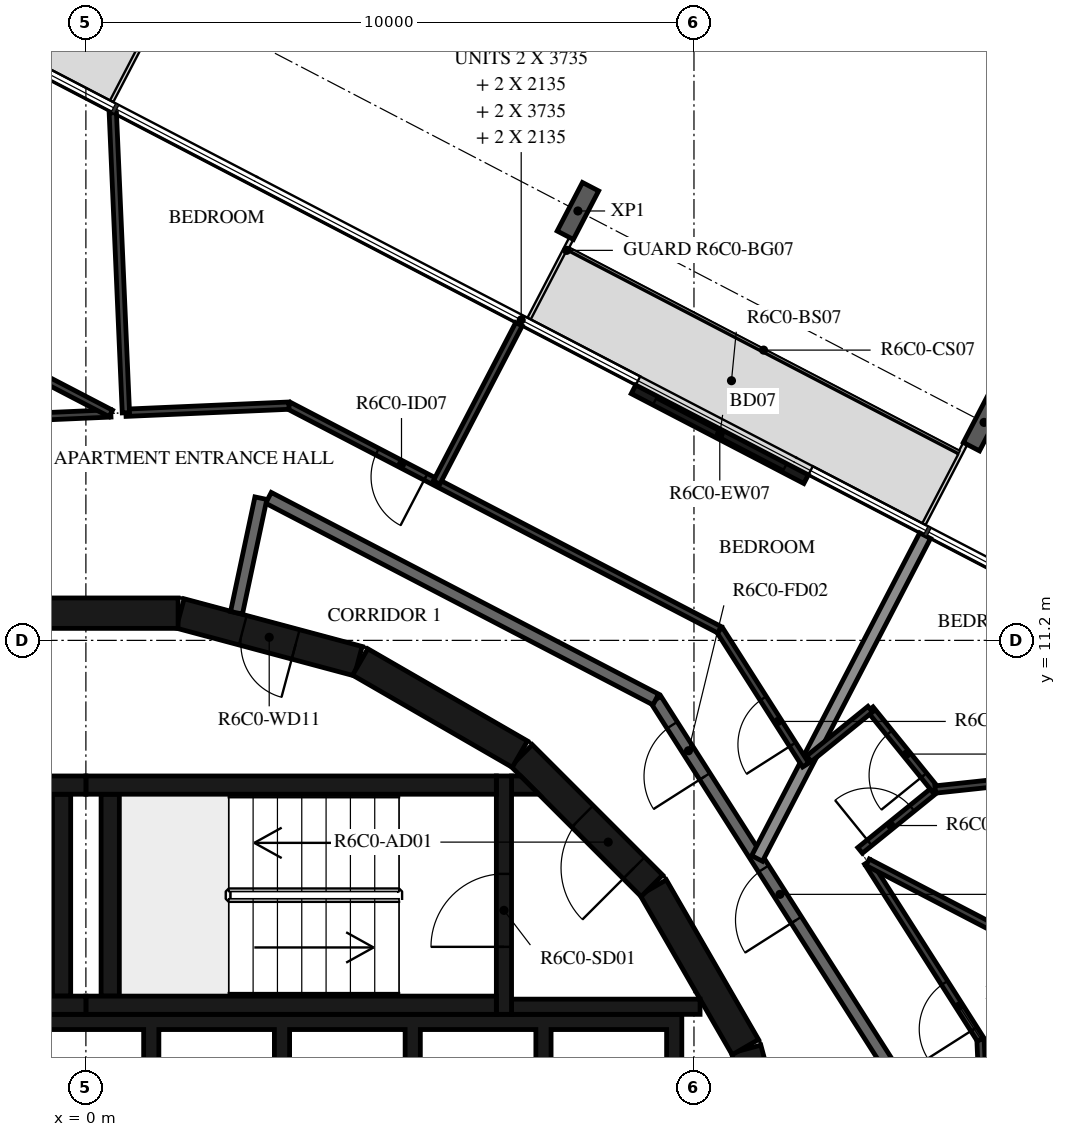
"""IFC4 building model, lengths in metres.
Left out: names, types, materials, properties, quantities, classifications, styles, units other than length and angle.
Written with IfcOpenShell. Run it as: python <this file> out.ifc"""

import sys

from ifc_helpers import new_model, si_unit, direction, frame, frame_2d, origin, origin_2d, place, context, subcontext, project, spatial, polyline, rectangle, i_section, outline, extrude, element, fill, save


model = new_model("IFC4")
c1 = context("Model", 3, precision=1e-05, world=origin(), true_north=direction((0.0, 1.0)))
c2 = subcontext(c1, "Body", "Model", "MODEL_VIEW")
j1 = project(units=[si_unit("LENGTHUNIT", "METRE"), si_unit("PLANEANGLEUNIT", "RADIAN")], contexts=[c1])
p1 = place(None, origin())
s1 = spatial("IfcSite", under=j1, at=p1, CompositionType="ELEMENT")
p2 = place(p1, origin())
s2 = spatial("IfcBuilding", under=s1, at=p2, CompositionType="ELEMENT")
p3 = place(p2, frame((0.0, 0.0, 247.7)))
s3 = spatial("IfcBuildingStorey", under=s2, at=p3, CompositionType="ELEMENT", Elevation=247.7)
for number, where, z_axis, x_axis in (
    (1, (14.771, 14.784, -0.38), (0.0, 0.0, 1.0), (0.887, -0.462, 0.0)),
    (2, (8.091, 18.261, -0.38), (0.0, 0.0, 1.0), (0.887, -0.462, 0.0)),
):
    element("IfcColumn", number, at=place(p3, frame(where, z_axis=z_axis, x_axis=x_axis)), inside=s3, PredefinedType="COLUMN", context=c2, shape_type="SweptSolid", body=[
        extrude(i_section(OverallWidth=0.3, OverallDepth=0.9, WebThickness=0.019, FlangeThickness=0.035, FilletRadius=0.03, at=origin_2d()), origin(), (0.0, 0.0, 1.0), 3.5),
    ])
p4 = place(p3, frame((11.844, 13.851, 0.0), z_axis=(0.0, 0.0, 1.0), x_axis=(-0.887014349583, 0.461741858221, 0.0)))
e3 = element("IfcWall", 3, at=p4, inside=s3, PredefinedType="STANDARD", context=c2, shape_type="SweptSolid", body=[
    extrude(rectangle(XDim=3.2, YDim=0.16, at=frame_2d((1.6, 0.0))), origin(), (0.0, 0.0, 1.0), 3.12),
])
p5 = place(p4, frame((0.4, 0.0, 0.0)))
e4 = element("IfcOpeningElement", 4, at=p5, cuts=e3, PredefinedType="OPENING", context=c2, shape_type="SweptSolid", body=[
    extrude(rectangle(XDim=2.4, YDim=2.4, at=frame_2d((1.2, 1.2))), frame((0.0, 0.09, 0.0), z_axis=(0.0, -1.0, 0.0), x_axis=(1.0, 0.0, 0.0)), (0.0, 0.0, 1.0), 0.18),
])
for number, where, z_axis, x_axis in (
    (5, (11.643, 1.55, 0.0), (0.0, 0.0, 1.0), (-0.259, 0.966, 0.0)),
    (6, (10.845, 4.51, 0.0), (0.0, 0.0, 1.0), (-0.5, 0.866, 0.0)),
):
    element("IfcWall", number, at=place(p3, frame(where, z_axis=z_axis, x_axis=x_axis)), inside=s3, PredefinedType="SHEAR", context=c2, shape_type="SweptSolid", body=[
        extrude(rectangle(XDim=3.033, YDim=0.5, at=frame_2d((1.516, 0.0))), origin(), (0.0, 0.0, 1.0), 3.12),
    ])
p6 = place(p3, frame((9.308, 7.164, 0.0), z_axis=(0.0, 0.0, 1.0), x_axis=(-0.707106781187, 0.707106781187, 0.0)))
e7 = element("IfcWall", 7, at=p6, inside=s3, PredefinedType="SHEAR", context=c2, shape_type="SweptSolid", body=[
    extrude(rectangle(XDim=3.032, YDim=0.5, at=frame_2d((1.516, 0.0))), origin(), (0.0, 0.0, 1.0), 3.12),
])
p7 = place(p6, frame((0.416, 0.0, 0.0)))
e8 = element("IfcOpeningElement", 8, at=p7, cuts=e7, PredefinedType="OPENING", context=c2, shape_type="SweptSolid", body=[
    extrude(rectangle(XDim=1.2, YDim=2.1, at=frame_2d((0.6, 1.05))), frame((0.0, 0.26, 0.0), z_axis=(0.0, -1.0, 0.0), x_axis=(1.0, 0.0, 0.0)), (0.0, 0.0, 1.0), 0.52),
])
p8 = place(p3, frame((7.137, 9.329, 0.0), z_axis=(0.0, 0.0, 1.0), x_axis=(-0.865975092491, 0.500087131594, 0.0)))
e9 = element("IfcWall", 9, at=p8, inside=s3, PredefinedType="SHEAR", context=c2, shape_type="SweptSolid", body=[
    extrude(rectangle(XDim=3.033, YDim=0.5, at=frame_2d((1.516, 0.0))), origin(), (0.0, 0.0, 1.0), 3.12),
])
p9 = place(p3, frame((4.479, 10.858, 0.0), z_axis=(0.0, 0.0, 1.0), x_axis=(-0.965948410781, 0.258734743916, 0.0)))
e10 = element("IfcWall", 10, at=p9, inside=s3, PredefinedType="SHEAR", context=c2, shape_type="SweptSolid", body=[
    extrude(rectangle(XDim=3.033, YDim=0.5, at=frame_2d((1.516, 0.0))), origin(), (0.0, 0.0, 1.0), 3.12),
])
p10 = place(p9, frame((1.066, 0.0, 0.0)))
e11 = element("IfcOpeningElement", 11, at=p10, cuts=e10, PredefinedType="OPENING", context=c2, shape_type="SweptSolid", body=[
    extrude(rectangle(XDim=0.9, YDim=2.1, at=frame_2d((0.45, 1.05))), frame((0.0, 0.26, 0.0), z_axis=(0.0, -1.0, 0.0), x_axis=(1.0, 0.0, 0.0)), (0.0, 0.0, 1.0), 0.52),
])
p11 = place(p3, frame((1.516, 11.647, 0.0), z_axis=(0.0, 0.0, 1.0), x_axis=(-1.0, 0.0, 0.0)))
e12 = element("IfcWall", 12, at=p11, inside=s3, PredefinedType="SHEAR", context=c2, shape_type="SweptSolid", body=[
    extrude(rectangle(XDim=3.033, YDim=0.5, at=frame_2d((1.516, 0.0))), origin(), (0.0, 0.0, 1.0), 3.12),
])
for number, where, z_axis, x_axis in (
    (13, (0.0, 5.2, 0.0), (0.0, 0.0, 1.0), (1.0, 0.0, 0.0)),
    (14, (0.0, 8.82, 0.0), (0.0, 0.0, 1.0), (1.0, 0.0, 0.0)),
):
    element("IfcWall", number, at=place(p3, frame(where, z_axis=z_axis, x_axis=x_axis)), inside=s3, PredefinedType="SHEAR", context=c2, shape_type="SweptSolid", body=[
        extrude(rectangle(XDim=6.75, YDim=0.3, at=frame_2d((3.375, 0.0))), origin(), (0.0, 0.0, 1.0), 3.12),
    ])
p12 = place(p3, frame((0.4, 5.35, 0.0), z_axis=(0.0, 0.0, 1.0), x_axis=(0.0, 1.0, 0.0)))
e15 = element("IfcWall", 15, at=p12, inside=s3, PredefinedType="SHEAR", context=c2, shape_type="SweptSolid", body=[
    extrude(rectangle(XDim=3.32, YDim=0.3, at=frame_2d((1.66, 0.0))), origin(), (0.0, 0.0, 1.0), 3.12),
])
p13 = place(p3, frame((6.875, 5.05, 0.0), z_axis=(0.0, 0.0, 1.0), x_axis=(0.0, 1.0, 0.0)))
e16 = element("IfcWall", 16, at=p13, inside=s3, PredefinedType="SHEAR", context=c2, shape_type="SweptSolid", body=[
    extrude(rectangle(XDim=3.92, YDim=0.25, at=frame_2d((1.96, 0.0))), origin(), (0.0, 0.0, 1.0), 3.12),
])
p14 = place(p13, frame((1.11, 0.0, 0.0)))
e17 = element("IfcOpeningElement", 17, at=p14, cuts=e16, PredefinedType="OPENING", context=c2, shape_type="SweptSolid", body=[
    extrude(rectangle(XDim=1.2, YDim=2.1, at=frame_2d((0.6, 1.05))), frame((0.0, 0.135, 0.0), z_axis=(0.0, -1.0, 0.0), x_axis=(1.0, 0.0, 0.0)), (0.0, 0.0, 1.0), 0.27),
])
p15 = place(p3, frame((7.0, 5.175, 0.0), z_axis=(0.0, 0.0, 1.0), x_axis=(1.0, 0.0, 0.0)))
e18 = element("IfcWall", 18, at=p15, inside=s3, PredefinedType="SHEAR", context=c2, shape_type="SweptSolid", body=[
    extrude(rectangle(XDim=3.1, YDim=0.25, at=frame_2d((1.55, 0.0))), origin(), (0.0, 0.0, 1.0), 3.12),
])
p16 = place(p3, origin())
e19 = element("IfcWall", 19, at=p16, inside=s3, PredefinedType="SHEAR", context=c2, shape_type="SweptSolid", body=[
    extrude(outline(polyline([(7.448, 8.67), (7.0, 8.67), (7.0, 8.97), (7.148, 8.97), (7.448, 8.67)])), origin(), (0.0, 0.0, 1.0), 3.12),
])
for number, where, z_axis, x_axis in (
    (20, (-6.75, 5.2, 0.0), (0.0, 0.0, 1.0), (1.0, 0.0, 0.0)),
    (21, (-6.75, 8.82, 0.0), (0.0, 0.0, 1.0), (1.0, 0.0, 0.0)),
):
    element("IfcWall", number, at=place(p3, frame(where, z_axis=z_axis, x_axis=x_axis)), inside=s3, PredefinedType="SHEAR", context=c2, shape_type="SweptSolid", body=[
        extrude(rectangle(XDim=6.75, YDim=0.3, at=frame_2d((3.375, 0.0))), origin(), (0.0, 0.0, 1.0), 3.12),
    ])
p17 = place(p3, frame((-0.4, 5.35, 0.0), z_axis=(0.0, 0.0, 1.0), x_axis=(0.0, 1.0, 0.0)))
e22 = element("IfcWall", 22, at=p17, inside=s3, PredefinedType="SHEAR", context=c2, shape_type="SweptSolid", body=[
    extrude(rectangle(XDim=3.32, YDim=0.3, at=frame_2d((1.66, 0.0))), origin(), (0.0, 0.0, 1.0), 3.12),
])
p18 = place(p3, origin())
e23 = element("IfcWall", 23, at=p18, inside=s3, PredefinedType="SHEAR", context=c2, shape_type="SweptSolid", body=[
    extrude(outline(polyline([(-9.55, 4.8), (-1.2, 4.8), (-1.2, 1.9), (-0.95, 1.9), (-0.95, 4.8), (0.95, 4.8), (0.95, 1.9), (1.2, 1.9), (1.2, 4.8), (3.1, 4.8), (3.1, 1.9), (3.35, 1.9), (3.35, 4.8), (5.25, 4.8), (5.25, 1.9), (5.5, 1.9), (5.5, 4.8), (7.4, 4.8), (7.4, 1.9), (7.65, 1.9), (7.65, 4.8), (9.55, 4.8), (9.55, 1.9), (9.8, 1.9), (9.8, 4.8), (9.8, 5.05), (-9.8, 5.05), (-9.8, 4.8), (-9.8, 1.9), (-9.55, 1.9), (-9.55, 4.8)])), origin(), (0.0, 0.0, 1.0), 3.12),
])
p19 = place(p3, frame((13.231, 4.172, 0.0), z_axis=(0.0, 0.0, 1.0), x_axis=(-0.537304397561, 0.843388394728, 0.0)))
e24 = element("IfcWall", 24, at=p19, inside=s3, PredefinedType="STANDARD", context=c2, shape_type="SweptSolid", body=[
    extrude(rectangle(XDim=7.181, YDim=0.2, at=frame_2d((3.59, 0.0))), origin(), (0.0, 0.0, 1.0), 3.12),
])
p20 = place(p19, frame((2.881, 0.0, 0.0)))
e25 = element("IfcOpeningElement", 25, at=p20, cuts=e24, PredefinedType="OPENING", context=c2, shape_type="SweptSolid", body=[
    extrude(rectangle(XDim=1.0, YDim=2.1, at=frame_2d((0.5, 1.05))), frame((0.0, 0.11, 0.0), z_axis=(0.0, -1.0, 0.0), x_axis=(1.0, 0.0, 0.0)), (0.0, 0.0, 1.0), 0.22),
])
p21 = place(p19, frame((5.681, 0.0, 0.0)))
e26 = element("IfcOpeningElement", 26, at=p21, cuts=e24, PredefinedType="OPENING", context=c2, shape_type="SweptSolid", body=[
    extrude(rectangle(XDim=1.0, YDim=2.1, at=frame_2d((0.5, 1.05))), frame((0.0, 0.11, 0.0), z_axis=(0.0, -1.0, 0.0), x_axis=(1.0, 0.0, 0.0)), (0.0, 0.0, 1.0), 0.22),
])
p22 = place(p3, frame((9.372, 10.228, 0.0), z_axis=(0.0, 0.0, 1.0), x_axis=(-0.887005184532, 0.461759464021, 0.0)))
e27 = element("IfcWall", 27, at=p22, inside=s3, PredefinedType="STANDARD", context=c2, shape_type="SweptSolid", body=[
    extrude(rectangle(XDim=7.181, YDim=0.2, at=frame_2d((3.591, 0.0))), origin(), (0.0, 0.0, 1.0), 3.12),
])
p23 = place(p3, frame((2.878, 13.538, 0.0), z_axis=(0.0, 0.0, 1.0), x_axis=(-0.207893604596, -0.978151444904, 0.0)))
e28 = element("IfcWall", 28, at=p23, inside=s3, PredefinedType="STANDARD", context=c2, shape_type="SweptSolid", body=[
    extrude(rectangle(XDim=1.927, YDim=0.2, at=frame_2d((0.963, 0.0))), origin(), (0.0, 0.0, 1.0), 3.12),
])
p24 = place(p3, frame((13.801, 12.922, 0.0), z_axis=(0.0, 0.0, 1.0), x_axis=(-0.461726485624, -0.887022351733, 0.0)))
e29 = element("IfcWall", 29, at=p24, inside=s3, PredefinedType="STANDARD", context=c2, shape_type="SweptSolid", body=[
    extrude(rectangle(XDim=5.984, YDim=0.2, at=frame_2d((2.992, 0.0))), origin(), (0.0, 0.0, 1.0), 2.73),
])
p25 = place(p3, frame((14.761, 3.5, 0.0), z_axis=(0.0, 0.0, 1.0), x_axis=(-0.04369750018, 0.999044808043, 0.0)))
e30 = element("IfcWall", 30, at=p25, inside=s3, PredefinedType="PARTITIONING", context=c2, shape_type="SweptSolid", body=[
    extrude(rectangle(XDim=1.14, YDim=0.12, at=frame_2d((0.57, 0.0))), origin(), (0.0, 0.0, 1.0), 3.12),
])
p26 = place(p3, frame((14.712, 4.639, 0.0), z_axis=(0.0, 0.0, 1.0), x_axis=(-0.537287126609, 0.843399397427, 0.0)))
e31 = element("IfcWall", 31, at=p26, inside=s3, PredefinedType="PARTITIONING", context=c2, shape_type="SweptSolid", body=[
    extrude(rectangle(XDim=3.453, YDim=0.12, at=frame_2d((1.727, 0.0))), origin(), (0.0, 0.0, 1.0), 3.12),
])
p27 = place(p26, frame((0.2, 0.0, 0.0)))
e32 = element("IfcOpeningElement", 32, at=p27, cuts=e31, PredefinedType="OPENING", context=c2, shape_type="SweptSolid", body=[
    extrude(rectangle(XDim=0.9, YDim=2.1, at=frame_2d((0.45, 1.05))), frame((0.0, 0.07, 0.0), z_axis=(0.0, -1.0, 0.0), x_axis=(1.0, 0.0, 0.0)), (0.0, 0.0, 1.0), 0.14),
])
p28 = place(p3, frame((12.732, 7.746, 0.0), z_axis=(0.0, 0.0, 1.0), x_axis=(0.777187694298, 0.62926885179, 0.0)))
e33 = element("IfcWall", 33, at=p28, inside=s3, PredefinedType="PARTITIONING", context=c2, shape_type="SweptSolid", body=[
    extrude(rectangle(XDim=1.591, YDim=0.12, at=frame_2d((0.795, 0.0))), origin(), (0.0, 0.0, 1.0), 3.12),
])
p29 = place(p28, frame((0.2, 0.0, 0.0)))
e34 = element("IfcOpeningElement", 34, at=p29, cuts=e33, PredefinedType="OPENING", context=c2, shape_type="SweptSolid", body=[
    extrude(rectangle(XDim=0.9, YDim=2.1, at=frame_2d((0.45, 1.05))), frame((0.0, 0.07, 0.0), z_axis=(0.0, -1.0, 0.0), x_axis=(1.0, 0.0, 0.0)), (0.0, 0.0, 1.0), 0.14),
])
p30 = place(p3, frame((13.969, 8.747, 0.0), z_axis=(0.0, 0.0, 1.0), x_axis=(-0.629359312443, 0.777114441921, 0.0)))
e35 = element("IfcWall", 35, at=p30, inside=s3, PredefinedType="PARTITIONING", context=c2, shape_type="SweptSolid", body=[
    extrude(rectangle(XDim=1.7, YDim=0.12, at=frame_2d((0.85, 0.0))), origin(), (0.0, 0.0, 1.0), 3.12),
])
p31 = place(p30, frame((0.3, 0.0, 0.0)))
e36 = element("IfcOpeningElement", 36, at=p31, cuts=e35, PredefinedType="OPENING", context=c2, shape_type="SweptSolid", body=[
    extrude(rectangle(XDim=0.9, YDim=2.1, at=frame_2d((0.45, 1.05))), frame((0.0, 0.07, 0.0), z_axis=(0.0, -1.0, 0.0), x_axis=(1.0, 0.0, 0.0)), (0.0, 0.0, 1.0), 0.14),
])
p32 = place(p3, frame((12.898, 10.069, 0.0), z_axis=(0.0, 0.0, 1.0), x_axis=(-0.777069405334, -0.629414918232, 0.0)))
e37 = element("IfcWall", 37, at=p32, inside=s3, PredefinedType="PARTITIONING", context=c2, shape_type="SweptSolid", body=[
    extrude(rectangle(XDim=1.296, YDim=0.12, at=frame_2d((0.648, 0.0))), origin(), (0.0, 0.0, 1.0), 3.12),
])
p33 = place(p3, frame((17.834, 4.96, 0.0), z_axis=(0.0, 0.0, 1.0), x_axis=(-0.887008743782, 0.461752626906, 0.0)))
e38 = element("IfcWall", 38, at=p33, inside=s3, PredefinedType="PARTITIONING", context=c2, shape_type="SweptSolid", body=[
    extrude(rectangle(XDim=5.612, YDim=0.12, at=frame_2d((2.806, 0.0))), origin(), (0.0, 0.0, 1.0), 3.12),
])
p34 = place(p33, frame((0.2, 0.0, 0.0)))
e39 = element("IfcOpeningElement", 39, at=p34, cuts=e38, PredefinedType="OPENING", context=c2, shape_type="SweptSolid", body=[
    extrude(rectangle(XDim=0.9, YDim=2.1, at=frame_2d((0.45, 1.05))), frame((0.0, 0.07, 0.0), z_axis=(0.0, -1.0, 0.0), x_axis=(1.0, 0.0, 0.0)), (0.0, 0.0, 1.0), 0.14),
])
p35 = place(p3, frame((20.48, 9.445, 0.0), z_axis=(0.0, 0.0, 1.0), x_axis=(-0.994311974195, -0.106506797776, 0.0)))
e40 = element("IfcWall", 40, at=p35, inside=s3, PredefinedType="PARTITIONING", context=c2, shape_type="SweptSolid", body=[
    extrude(rectangle(XDim=6.549, YDim=0.12, at=frame_2d((3.274, 0.0))), origin(), (0.0, 0.0, 1.0), 3.12),
])
p36 = place(p3, frame((11.838, 9.15, 0.0), z_axis=(0.0, 0.0, 1.0), x_axis=(-0.537288949014, 0.843398236462, 0.0)))
e41 = element("IfcWall", 41, at=p36, inside=s3, PredefinedType="PARTITIONING", context=c2, shape_type="SweptSolid", body=[
    extrude(rectangle(XDim=2.636, YDim=0.12, at=frame_2d((1.318, 0.0))), origin(), (0.0, 0.0, 1.0), 3.12),
])
p37 = place(p36, frame((0.4, 0.0, 0.0)))
e42 = element("IfcOpeningElement", 42, at=p37, cuts=e41, PredefinedType="OPENING", context=c2, shape_type="SweptSolid", body=[
    extrude(rectangle(XDim=0.9, YDim=2.1, at=frame_2d((0.45, 1.05))), frame((0.0, 0.07, 0.0), z_axis=(0.0, -1.0, 0.0), x_axis=(1.0, 0.0, 0.0)), (0.0, 0.0, 1.0), 0.14),
])
p38 = place(p3, frame((10.421, 11.373, 0.0), z_axis=(0.0, 0.0, 1.0), x_axis=(-0.887012970857, 0.461744506769, 0.0)))
e43 = element("IfcWall", 43, at=p38, inside=s3, PredefinedType="PARTITIONING", context=c2, shape_type="SweptSolid", body=[
    extrude(rectangle(XDim=7.985, YDim=0.12, at=frame_2d((3.992, 0.0))), origin(), (0.0, 0.0, 1.0), 3.12),
])
p39 = place(p38, frame((5.448, 0.0, 0.0)))
e44 = element("IfcOpeningElement", 44, at=p39, cuts=e43, PredefinedType="OPENING", context=c2, shape_type="SweptSolid", body=[
    extrude(rectangle(XDim=0.9, YDim=2.1, at=frame_2d((0.45, 1.05))), frame((0.0, 0.07, 0.0), z_axis=(0.0, -1.0, 0.0), x_axis=(1.0, 0.0, 0.0)), (0.0, 0.0, 1.0), 0.14),
])
p40 = place(p3, frame((3.339, 15.06, 0.0), z_axis=(0.0, 0.0, 1.0), x_axis=(-0.999045829762, -0.043674134634, 0.0)))
e45 = element("IfcWall", 45, at=p40, inside=s3, PredefinedType="PARTITIONING", context=c2, shape_type="SweptSolid", body=[
    extrude(rectangle(XDim=2.683, YDim=0.12, at=frame_2d((1.342, 0.0))), origin(), (0.0, 0.0, 1.0), 3.12),
])
p41 = place(p3, frame((0.41, 14.932, 0.0), z_axis=(0.0, 0.0, 1.0), x_axis=(-0.99904802852, -0.043623808982, 0.0)))
e46 = element("IfcWall", 46, at=p41, inside=s3, PredefinedType="PARTITIONING", context=c2, shape_type="SweptSolid", body=[
    extrude(rectangle(XDim=5.054, YDim=0.12, at=frame_2d((2.527, 0.0))), origin(), (0.0, 0.0, 1.0), 3.12),
])
p42 = place(p41, frame((1.5, 0.0, 0.0)))
e47 = element("IfcOpeningElement", 47, at=p42, cuts=e46, PredefinedType="OPENING", context=c2, shape_type="SweptSolid", body=[
    extrude(rectangle(XDim=0.8, YDim=2.1, at=frame_2d((0.4, 1.05))), frame((0.0, 0.07, 0.0), z_axis=(0.0, -1.0, 0.0), x_axis=(1.0, 0.0, 0.0)), (0.0, 0.0, 1.0), 0.14),
])
p43 = place(p3, frame((7.122, 16.399, 0.0), z_axis=(0.0, 0.0, 1.0), x_axis=(-0.461763975246, -0.887002836053, 0.0)))
e48 = element("IfcWall", 48, at=p43, inside=s3, PredefinedType="PARTITIONING", context=c2, shape_type="SweptSolid", body=[
    extrude(rectangle(XDim=2.934, YDim=0.12, at=frame_2d((1.467, 0.0))), origin(), (0.0, 0.0, 1.0), 2.73),
])
p44 = place(p3, frame((0.442, 19.876, 0.0), z_axis=(0.0, 0.0, 1.0), x_axis=(0.04366038102, -0.999046430918, 0.0)))
e49 = element("IfcWall", 49, at=p44, inside=s3, PredefinedType="PARTITIONING", context=c2, shape_type="SweptSolid", body=[
    extrude(rectangle(XDim=4.938, YDim=0.12, at=frame_2d((2.469, 0.0))), origin(), (0.0, 0.0, 1.0), 3.12),
])
p45 = place(p3, frame((0.41, 14.932, 0.0), z_axis=(0.0, 0.0, 1.0), x_axis=(-0.887012293034, 0.461745808867, 0.0)))
e50 = element("IfcWall", 50, at=p45, inside=s3, PredefinedType="PARTITIONING", context=c2, shape_type="SweptSolid", body=[
    extrude(rectangle(XDim=10.246, YDim=0.12, at=frame_2d((5.123, 0.0))), origin(), (0.0, 0.0, 1.0), 3.12),
])
p46 = place(p45, frame((4.725, 0.0, 0.0)))
e51 = element("IfcOpeningElement", 51, at=p46, cuts=e50, PredefinedType="OPENING", context=c2, shape_type="SweptSolid", body=[
    extrude(rectangle(XDim=0.9, YDim=2.1, at=frame_2d((0.45, 1.05))), frame((0.0, 0.07, 0.0), z_axis=(0.0, -1.0, 0.0), x_axis=(1.0, 0.0, 0.0)), (0.0, 0.0, 1.0), 0.14),
])
p47 = place(p5, origin())
e52 = element("IfcDoor", 52, at=p47, inside=s3, OperationType="DOUBLE_DOOR_SLIDING", PredefinedType="DOOR", context=c2, shape_type="SweptSolid", body=[
    extrude(rectangle(XDim=2.4, YDim=2.4, at=frame_2d((1.2, 1.2))), frame((0.0, 0.025, 0.0), z_axis=(0.0, -1.0, 0.0), x_axis=(1.0, 0.0, 0.0)), (0.0, 0.0, 1.0), 0.05),
])
fill(e4, e52)
p48 = place(p14, origin())
e53 = element("IfcDoor", 53, at=p48, inside=s3, OperationType="SINGLE_SWING_LEFT", PredefinedType="DOOR", context=c2, shape_type="SweptSolid", body=[
    extrude(rectangle(XDim=1.2, YDim=2.1, at=frame_2d((0.6, 1.05))), frame((0.0, 0.025, 0.0), z_axis=(0.0, -1.0, 0.0), x_axis=(1.0, 0.0, 0.0)), (0.0, 0.0, 1.0), 0.05),
])
fill(e17, e53)
p49 = place(p7, origin())
e54 = element("IfcDoor", 54, at=p49, inside=s3, OperationType="SINGLE_SWING_RIGHT", PredefinedType="DOOR", context=c2, shape_type="SweptSolid", body=[
    extrude(rectangle(XDim=1.2, YDim=2.1, at=frame_2d((0.6, 1.05))), frame((0.0, 0.025, 0.0), z_axis=(0.0, -1.0, 0.0), x_axis=(1.0, 0.0, 0.0)), (0.0, 0.0, 1.0), 0.05),
])
fill(e8, e54)
p50 = place(p10, origin())
e55 = element("IfcDoor", 55, at=p50, inside=s3, OperationType="SINGLE_SWING_LEFT", PredefinedType="DOOR", context=c2, shape_type="SweptSolid", body=[
    extrude(rectangle(XDim=0.9, YDim=2.1, at=frame_2d((0.45, 1.05))), frame((0.0, 0.025, 0.0), z_axis=(0.0, -1.0, 0.0), x_axis=(1.0, 0.0, 0.0)), (0.0, 0.0, 1.0), 0.05),
])
fill(e11, e55)
p51 = place(p20, origin())
e56 = element("IfcDoor", 56, at=p51, inside=s3, OperationType="SINGLE_SWING_LEFT", PredefinedType="DOOR", context=c2, shape_type="SweptSolid", body=[
    extrude(rectangle(XDim=1.0, YDim=2.1, at=frame_2d((0.5, 1.05))), frame((0.0, 0.025, 0.0), z_axis=(0.0, -1.0, 0.0), x_axis=(1.0, 0.0, 0.0)), (0.0, 0.0, 1.0), 0.05),
])
fill(e25, e56)
p52 = place(p27, origin())
e57 = element("IfcDoor", 57, at=p52, inside=s3, OperationType="SINGLE_SWING_LEFT", PredefinedType="DOOR", context=c2, shape_type="SweptSolid", body=[
    extrude(rectangle(XDim=0.9, YDim=2.1, at=frame_2d((0.45, 1.05))), frame((0.0, 0.025, 0.0), z_axis=(0.0, -1.0, 0.0), x_axis=(1.0, 0.0, 0.0)), (0.0, 0.0, 1.0), 0.05),
])
fill(e32, e57)
p53 = place(p29, origin())
e58 = element("IfcDoor", 58, at=p53, inside=s3, OperationType="SINGLE_SWING_RIGHT", PredefinedType="DOOR", context=c2, shape_type="SweptSolid", body=[
    extrude(rectangle(XDim=0.9, YDim=2.1, at=frame_2d((0.45, 1.05))), frame((0.0, 0.025, 0.0), z_axis=(0.0, -1.0, 0.0), x_axis=(1.0, 0.0, 0.0)), (0.0, 0.0, 1.0), 0.05),
])
fill(e34, e58)
p54 = place(p31, origin())
e59 = element("IfcDoor", 59, at=p54, inside=s3, OperationType="SINGLE_SWING_LEFT", PredefinedType="DOOR", context=c2, shape_type="SweptSolid", body=[
    extrude(rectangle(XDim=0.9, YDim=2.1, at=frame_2d((0.45, 1.05))), frame((0.0, 0.025, 0.0), z_axis=(0.0, -1.0, 0.0), x_axis=(1.0, 0.0, 0.0)), (0.0, 0.0, 1.0), 0.05),
])
fill(e36, e59)
p55 = place(p21, origin())
e60 = element("IfcDoor", 60, at=p55, inside=s3, OperationType="SINGLE_SWING_LEFT", PredefinedType="DOOR", context=c2, shape_type="SweptSolid", body=[
    extrude(rectangle(XDim=1.0, YDim=2.1, at=frame_2d((0.5, 1.05))), frame((0.0, 0.025, 0.0), z_axis=(0.0, -1.0, 0.0), x_axis=(1.0, 0.0, 0.0)), (0.0, 0.0, 1.0), 0.05),
])
fill(e26, e60)
p56 = place(p37, origin())
e61 = element("IfcDoor", 61, at=p56, inside=s3, OperationType="SINGLE_SWING_LEFT", PredefinedType="DOOR", context=c2, shape_type="SweptSolid", body=[
    extrude(rectangle(XDim=0.9, YDim=2.1, at=frame_2d((0.45, 1.05))), frame((0.0, 0.025, 0.0), z_axis=(0.0, -1.0, 0.0), x_axis=(1.0, 0.0, 0.0)), (0.0, 0.0, 1.0), 0.05),
])
fill(e42, e61)
p57 = place(p39, origin())
e62 = element("IfcDoor", 62, at=p57, inside=s3, OperationType="SINGLE_SWING_RIGHT", PredefinedType="DOOR", context=c2, shape_type="SweptSolid", body=[
    extrude(rectangle(XDim=0.9, YDim=2.1, at=frame_2d((0.45, 1.05))), frame((0.0, 0.025, 0.0), z_axis=(0.0, -1.0, 0.0), x_axis=(1.0, 0.0, 0.0)), (0.0, 0.0, 1.0), 0.05),
])
fill(e44, e62)
save(model, sys.argv[1])
